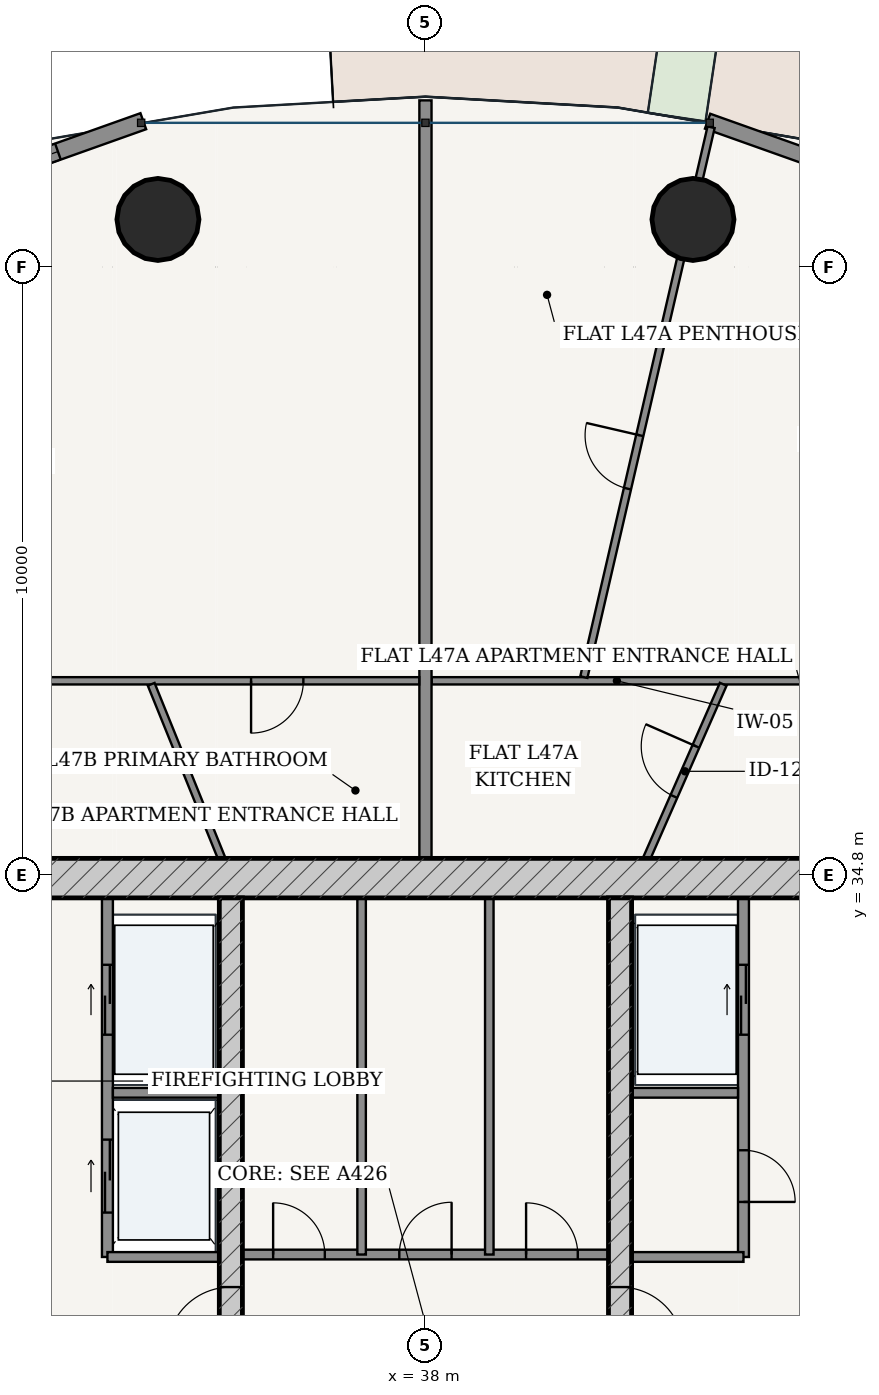
"""IFC4 building model, lengths in metres.
Left out: names, types, materials, properties, quantities, classifications, styles, units other than length and angle.
Written with IfcOpenShell. Run it as: python <this file> out.ifc"""

import sys

from ifc_helpers import new_model, si_unit, direction, frame, frame_2d, origin, origin_2d, place, context, subcontext, project, spatial, rectangle, hollow_circle, extrude, source, transform, mapped, element, fill, save


model = new_model("IFC4")
c1 = context("Model", 3, precision=1e-05, world=origin(), true_north=direction((-0.2419218956, 0.970295726276)))
c2 = subcontext(c1, "Body", "Model", "MODEL_VIEW")
j1 = project(units=[si_unit("LENGTHUNIT", "METRE"), si_unit("PLANEANGLEUNIT", "RADIAN")], contexts=[c1])
p1 = place(None, origin())
s1 = spatial("IfcSite", under=j1, at=p1, CompositionType="ELEMENT")
p2 = place(p1, origin())
s2 = spatial("IfcBuilding", under=s1, at=p2, CompositionType="ELEMENT")
p3 = place(p2, frame((0.0, 0.0, 178.6)))
s3 = spatial("IfcBuildingStorey", under=s2, at=p3, CompositionType="ELEMENT", Elevation=178.6)
p4 = place(p3, frame((28.725, 34.75, 0.0), z_axis=(0.0, 0.0, 1.0), x_axis=(1.0, 0.0, 0.0)))
e1 = element("IfcWall", 1, at=p4, inside=s3, PredefinedType="SHEAR", context=c2, shape_type="SweptSolid", body=[
    extrude(rectangle(XDim=18.55, YDim=0.65, at=frame_2d((9.275, 0.0))), origin(), (0.0, 0.0, 1.0), 3.33),
])
p5 = place(p3, frame((34.8, 19.175, 0.0), z_axis=(0.0, 0.0, 1.0), x_axis=(0.0, 1.0, 0.0)))
e2 = element("IfcWall", 2, at=p5, inside=s3, PredefinedType="SHEAR", context=c2, shape_type="SweptSolid", body=[
    extrude(rectangle(XDim=15.25, YDim=0.38, at=frame_2d((7.625, 0.0))), origin(), (0.0, 0.0, 1.0), 3.33),
])
p6 = place(p5, frame((7.8, 0.0, 0.0)))
e3 = element("IfcOpeningElement", 3, at=p6, cuts=e2, PredefinedType="OPENING", context=c2, shape_type="SweptSolid", body=[
    extrude(rectangle(XDim=1.05, YDim=2.15, at=frame_2d((0.525, 1.075))), frame((0.0, 0.2, 0.0), z_axis=(0.0, -1.0, 0.0), x_axis=(1.0, 0.0, 0.0)), (0.0, 0.0, 1.0), 0.4),
])
p7 = place(p3, frame((41.2, 19.175, 0.0), z_axis=(0.0, 0.0, 1.0), x_axis=(0.0, 1.0, 0.0)))
e4 = element("IfcWall", 4, at=p7, inside=s3, PredefinedType="SHEAR", context=c2, shape_type="SweptSolid", body=[
    extrude(rectangle(XDim=15.25, YDim=0.38, at=frame_2d((7.625, 0.0))), origin(), (0.0, 0.0, 1.0), 3.33),
])
p8 = place(p7, frame((7.8, 0.0, 0.0)))
e5 = element("IfcOpeningElement", 5, at=p8, cuts=e4, PredefinedType="OPENING", context=c2, shape_type="SweptSolid", body=[
    extrude(rectangle(XDim=1.05, YDim=2.15, at=frame_2d((0.525, 1.075))), frame((0.0, 0.2, 0.0), z_axis=(0.0, -1.0, 0.0), x_axis=(1.0, 0.0, 0.0)), (0.0, 0.0, 1.0), 0.4),
])
for number, where, z_axis, x_axis in (
    (6, (42.399, 45.582, 0.0), (0.0, 0.0, 1.0), (1.0, 0.0, 0.0)),
    (7, (33.601, 45.582, 0.0), (0.0, 0.0, 1.0), (1.0, 0.0, 0.0)),
):
    element("IfcColumn", number, at=place(p3, frame(where, z_axis=z_axis, x_axis=x_axis)), inside=s3, PredefinedType="COLUMN", context=c2, shape_type="SweptSolid", body=[
        extrude(hollow_circle(Radius=0.675, WallThickness=0.042, at=origin_2d()), origin(), (0.0, 0.0, 1.0), 3.6),
    ])
p9 = place(p3, frame((51.503, 44.043, 0.0), z_axis=(0.0, 0.0, 1.0), x_axis=(-0.942095406405, 0.335344964522, 0.0)))
e8 = element("IfcWall", 8, at=p9, inside=s3, PredefinedType="SOLIDWALL", context=c2, shape_type="SweptSolid", body=[
    extrude(rectangle(XDim=9.408, YDim=0.26, at=frame_2d((4.704, 0.0))), origin(), (0.0, 0.0, 1.0), 3.33),
])
p10 = place(p9, frame((4.029, 0.0, 0.0)))
e9 = element("IfcOpeningElement", 9, at=p10, cuts=e8, PredefinedType="OPENING", context=c2, shape_type="SweptSolid", body=[
    extrude(rectangle(XDim=1.35, YDim=2.2, at=frame_2d((0.675, 1.1))), frame((0.0, 0.14, 0.0), z_axis=(0.0, -1.0, 0.0), x_axis=(1.0, 0.0, 0.0)), (0.0, 0.0, 1.0), 0.28),
])
p11 = place(p3, frame((33.36, 47.198, 0.0), z_axis=(0.0, 0.0, 1.0), x_axis=(-0.942095406405, -0.335344964522, 0.0)))
e10 = element("IfcWall", 10, at=p11, inside=s3, PredefinedType="SOLIDWALL", context=c2, shape_type="SweptSolid", body=[
    extrude(rectangle(XDim=9.408, YDim=0.28, at=frame_2d((4.704, 0.0))), origin(), (0.0, 0.0, 1.0), 3.33),
])
p12 = place(p11, frame((1.49, 0.0, 0.85)))
e11 = element("IfcOpeningElement", 11, at=p12, cuts=e10, PredefinedType="OPENING", context=c2, shape_type="SweptSolid", body=[
    extrude(rectangle(XDim=2.1, YDim=1.95, at=frame_2d((1.05, 0.975))), frame((0.0, 0.15, 0.0), z_axis=(0.0, -1.0, 0.0), x_axis=(1.0, 0.0, 0.0)), (0.0, 0.0, 1.0), 0.3),
])
p13 = place(p11, frame((5.818, 0.0, 0.85)))
e12 = element("IfcOpeningElement", 12, at=p13, cuts=e10, PredefinedType="OPENING", context=c2, shape_type="SweptSolid", body=[
    extrude(rectangle(XDim=2.1, YDim=1.95, at=frame_2d((1.05, 0.975))), frame((0.0, 0.15, 0.0), z_axis=(0.0, -1.0, 0.0), x_axis=(1.0, 0.0, 0.0)), (0.0, 0.0, 1.0), 0.3),
])
p14 = place(p3, frame((32.77, 28.52, 0.0), z_axis=(0.0, 0.0, 1.0), x_axis=(0.0, 1.0, 0.0)))
e13 = element("IfcWall", 13, at=p14, inside=s3, PredefinedType="PARTITIONING", context=c2, shape_type="SweptSolid", body=[
    extrude(rectangle(XDim=5.905, YDim=0.18, at=frame_2d((2.953, 0.0))), origin(), (0.0, 0.0, 1.0), 3.33),
])
p15 = place(p14, frame((3.655, 0.0, 0.0)))
e14 = element("IfcOpeningElement", 14, at=p15, cuts=e13, PredefinedType="OPENING", context=c2, shape_type="SweptSolid", body=[
    extrude(rectangle(XDim=1.15, YDim=2.2, at=frame_2d((0.575, 1.1))), frame((0.0, 0.1, 0.0), z_axis=(0.0, -1.0, 0.0), x_axis=(1.0, 0.0, 0.0)), (0.0, 0.0, 1.0), 0.2),
])
p16 = place(p14, frame((0.73, 0.0, 0.0)))
e15 = element("IfcOpeningElement", 15, at=p16, cuts=e13, PredefinedType="OPENING", context=c2, shape_type="SweptSolid", body=[
    extrude(rectangle(XDim=1.2, YDim=2.25, at=frame_2d((0.6, 1.125))), frame((0.0, 0.1, 0.0), z_axis=(0.0, -1.0, 0.0), x_axis=(1.0, 0.0, 0.0)), (0.0, 0.0, 1.0), 0.2),
])
p17 = place(p3, frame((32.86, 31.22, 0.0), z_axis=(0.0, 0.0, 1.0), x_axis=(1.0, 0.0, 0.0)))
e16 = element("IfcWall", 16, at=p17, inside=s3, PredefinedType="PARTITIONING", context=c2, shape_type="SweptSolid", body=[
    extrude(rectangle(XDim=1.75, YDim=0.16, at=frame_2d((0.875, 0.0))), origin(), (0.0, 0.0, 1.0), 3.33),
])
p18 = place(p3, frame((32.77, 28.52, 0.0), z_axis=(0.0, 0.0, 1.0), x_axis=(1.0, 0.0, 0.0)))
e17 = element("IfcWall", 17, at=p18, inside=s3, PredefinedType="PARTITIONING", context=c2, shape_type="SweptSolid", body=[
    extrude(rectangle(XDim=1.84, YDim=0.16, at=frame_2d((0.92, 0.0))), origin(), (0.0, 0.0, 1.0), 3.33),
])
p19 = place(p3, frame((43.23, 28.52, 0.0), z_axis=(0.0, 0.0, 1.0), x_axis=(0.0, 1.0, 0.0)))
e18 = element("IfcWall", 18, at=p19, inside=s3, PredefinedType="PARTITIONING", context=c2, shape_type="SweptSolid", body=[
    extrude(rectangle(XDim=5.905, YDim=0.18, at=frame_2d((2.953, 0.0))), origin(), (0.0, 0.0, 1.0), 3.33),
])
p20 = place(p19, frame((0.905, 0.0, 0.0)))
e19 = element("IfcOpeningElement", 19, at=p20, cuts=e18, PredefinedType="OPENING", context=c2, shape_type="SweptSolid", body=[
    extrude(rectangle(XDim=0.85, YDim=2.1, at=frame_2d((0.425, 1.05))), frame((0.0, 0.1, 0.0), z_axis=(0.0, -1.0, 0.0), x_axis=(1.0, 0.0, 0.0)), (0.0, 0.0, 1.0), 0.2),
])
p21 = place(p19, frame((3.655, 0.0, 0.0)))
e20 = element("IfcOpeningElement", 20, at=p21, cuts=e18, PredefinedType="OPENING", context=c2, shape_type="SweptSolid", body=[
    extrude(rectangle(XDim=1.15, YDim=2.2, at=frame_2d((0.575, 1.1))), frame((0.0, 0.1, 0.0), z_axis=(0.0, -1.0, 0.0), x_axis=(1.0, 0.0, 0.0)), (0.0, 0.0, 1.0), 0.2),
])
p22 = place(p3, frame((41.39, 31.22, 0.0), z_axis=(0.0, 0.0, 1.0), x_axis=(1.0, 0.0, 0.0)))
e21 = element("IfcWall", 21, at=p22, inside=s3, PredefinedType="PARTITIONING", context=c2, shape_type="SweptSolid", body=[
    extrude(rectangle(XDim=1.75, YDim=0.16, at=frame_2d((0.875, 0.0))), origin(), (0.0, 0.0, 1.0), 3.33),
])
p23 = place(p3, frame((41.39, 28.52, 0.0), z_axis=(0.0, 0.0, 1.0), x_axis=(1.0, 0.0, 0.0)))
e22 = element("IfcWall", 22, at=p23, inside=s3, PredefinedType="PARTITIONING", context=c2, shape_type="SweptSolid", body=[
    extrude(rectangle(XDim=1.84, YDim=0.16, at=frame_2d((0.92, 0.0))), origin(), (0.0, 0.0, 1.0), 3.33),
])
p24 = place(p3, frame((34.99, 28.56, 0.0), z_axis=(0.0, 0.0, 1.0), x_axis=(1.0, 0.0, 0.0)))
e23 = element("IfcWall", 23, at=p24, inside=s3, PredefinedType="PARTITIONING", context=c2, shape_type="SweptSolid", body=[
    extrude(rectangle(XDim=6.02, YDim=0.16, at=frame_2d((3.01, 0.0))), origin(), (0.0, 0.0, 1.0), 3.33),
])
p25 = place(p24, frame((0.505, 0.0, 0.0)))
e24 = element("IfcOpeningElement", 24, at=p25, cuts=e23, PredefinedType="OPENING", context=c2, shape_type="SweptSolid", body=[
    extrude(rectangle(XDim=0.85, YDim=2.1, at=frame_2d((0.425, 1.05))), frame((0.0, 0.09, 0.0), z_axis=(0.0, -1.0, 0.0), x_axis=(1.0, 0.0, 0.0)), (0.0, 0.0, 1.0), 0.18),
])
p26 = place(p24, frame((2.58, 0.0, 0.0)))
e25 = element("IfcOpeningElement", 25, at=p26, cuts=e23, PredefinedType="OPENING", context=c2, shape_type="SweptSolid", body=[
    extrude(rectangle(XDim=0.86, YDim=2.1, at=frame_2d((0.43, 1.05))), frame((0.0, 0.09, 0.0), z_axis=(0.0, -1.0, 0.0), x_axis=(1.0, 0.0, 0.0)), (0.0, 0.0, 1.0), 0.18),
])
p27 = place(p24, frame((4.665, 0.0, 0.0)))
e26 = element("IfcOpeningElement", 26, at=p27, cuts=e23, PredefinedType="OPENING", context=c2, shape_type="SweptSolid", body=[
    extrude(rectangle(XDim=0.85, YDim=2.1, at=frame_2d((0.425, 1.05))), frame((0.0, 0.09, 0.0), z_axis=(0.0, -1.0, 0.0), x_axis=(1.0, 0.0, 0.0)), (0.0, 0.0, 1.0), 0.18),
])
for number, where, z_axis, x_axis in (
    (27, (36.95, 28.56, 0.0), (0.0, 0.0, 1.0), (0.0, 1.0, 0.0)),
    (28, (39.05, 28.56, 0.0), (0.0, 0.0, 1.0), (0.0, 1.0, 0.0)),
):
    element("IfcWall", number, at=place(p3, frame(where, z_axis=z_axis, x_axis=x_axis)), inside=s3, PredefinedType="PARTITIONING", context=c2, shape_type="SweptSolid", body=[
        extrude(rectangle(XDim=5.865, YDim=0.14, at=frame_2d((2.933, 0.0))), origin(), (0.0, 0.0, 1.0), 3.33),
    ])
p28 = place(p3, frame((38.102, 37.995, 0.0), z_axis=(0.0, 0.0, 1.0), x_axis=(1.0, 0.0, 0.0)))
e29 = element("IfcWall", 29, at=p28, inside=s3, PredefinedType="PARTITIONING", context=c2, shape_type="SweptSolid", body=[
    extrude(rectangle(XDim=6.093, YDim=0.12, at=frame_2d((3.046, 0.0))), origin(), (0.0, 0.0, 1.0), 2.776),
])
p29 = place(p3, frame((40.605, 38.055, 0.0), z_axis=(0.0, 0.0, 1.0), x_axis=(0.225466493239, 0.974250922723, 0.0)))
e30 = element("IfcWall", 30, at=p29, inside=s3, PredefinedType="PARTITIONING", context=c2, shape_type="SweptSolid", body=[
    extrude(rectangle(XDim=9.282, YDim=0.12, at=frame_2d((4.641, 0.0))), origin(), (0.0, 0.0, 1.0), 2.776),
])
p30 = place(p29, frame((3.182, 0.0, 0.0)))
e31 = element("IfcOpeningElement", 31, at=p30, cuts=e30, PredefinedType="OPENING", context=c2, shape_type="SweptSolid", body=[
    extrude(rectangle(XDim=0.9, YDim=2.15, at=frame_2d((0.45, 1.075))), frame((0.0, 0.07, 0.0), z_axis=(0.0, -1.0, 0.0), x_axis=(1.0, 0.0, 0.0)), (0.0, 0.0, 1.0), 0.14),
])
p31 = place(p3, frame((41.638, 35.075, 0.0), z_axis=(0.0, 0.0, 1.0), x_axis=(0.402456087228, 0.915439292282, 0.0)))
e32 = element("IfcWall", 32, at=p31, inside=s3, PredefinedType="PARTITIONING", context=c2, shape_type="SweptSolid", body=[
    extrude(rectangle(XDim=3.128, YDim=0.12, at=frame_2d((1.564, 0.0))), origin(), (0.0, 0.0, 1.0), 3.33),
])
p32 = place(p31, frame((1.114, 0.0, 0.0)))
e33 = element("IfcOpeningElement", 33, at=p32, cuts=e32, PredefinedType="OPENING", context=c2, shape_type="SweptSolid", body=[
    extrude(rectangle(XDim=0.9, YDim=2.15, at=frame_2d((0.45, 1.075))), frame((0.0, 0.07, 0.0), z_axis=(0.0, -1.0, 0.0), x_axis=(1.0, 0.0, 0.0)), (0.0, 0.0, 1.0), 0.14),
])
p33 = place(p3, frame((38.0, 35.075, 0.0), z_axis=(0.0, 0.0, 1.0), x_axis=(0.0, 1.0, 0.0)))
e34 = element("IfcWall", 34, at=p33, inside=s3, PredefinedType="PARTITIONING", context=c2, shape_type="SweptSolid", body=[
    extrude(rectangle(XDim=12.465, YDim=0.2, at=frame_2d((6.232, 0.0))), origin(), (0.0, 0.0, 1.0), 2.415),
])
p34 = place(p3, frame((31.805, 37.995, 0.0), z_axis=(0.0, 0.0, 1.0), x_axis=(1.0, 0.0, 0.0)))
e35 = element("IfcWall", 35, at=p34, inside=s3, PredefinedType="PARTITIONING", context=c2, shape_type="SweptSolid", body=[
    extrude(rectangle(XDim=6.093, YDim=0.12, at=frame_2d((3.046, 0.0))), origin(), (0.0, 0.0, 1.0), 2.776),
])
p35 = place(p34, frame((3.327, 0.0, 0.0)))
e36 = element("IfcOpeningElement", 36, at=p35, cuts=e35, PredefinedType="OPENING", context=c2, shape_type="SweptSolid", body=[
    extrude(rectangle(XDim=0.86, YDim=2.15, at=frame_2d((0.43, 1.075))), frame((0.0, 0.07, 0.0), z_axis=(0.0, -1.0, 0.0), x_axis=(1.0, 0.0, 0.0)), (0.0, 0.0, 1.0), 0.14),
])
p36 = place(p3, frame((34.649, 35.075, 0.0), z_axis=(0.0, 0.0, 1.0), x_axis=(-0.375339921816, 0.926887233212, 0.0)))
e37 = element("IfcWall", 37, at=p36, inside=s3, PredefinedType="PARTITIONING", context=c2, shape_type="SweptSolid", body=[
    extrude(rectangle(XDim=3.088, YDim=0.12, at=frame_2d((1.544, 0.0))), origin(), (0.0, 0.0, 1.0), 3.33),
])
m1 = source(origin(), c2, "Body", "SweptSolid", [
    extrude(rectangle(XDim=2.1, YDim=1.95, at=frame_2d((1.05, 0.975))), frame((0.0, 0.03, 0.0), z_axis=(0.0, -1.0, 0.0), x_axis=(1.0, 0.0, 0.0)), (0.0, 0.0, 1.0), 0.06),
])
p37 = place(p12, origin())
e38 = element("IfcWindow", 38, at=p37, inside=s3, PartitioningType="SINGLE_PANEL", PredefinedType="WINDOW", context=c2, shape_type="MappedRepresentation", body=[
    mapped(m1, transform((0.0, 0.0, 0.0), scale=1.0)),
])
fill(e11, e38)
m2 = source(origin(), c2, "Body", "SweptSolid", [
    extrude(rectangle(XDim=1.05, YDim=2.15, at=frame_2d((0.525, 1.075))), frame((0.0, 0.025, 0.0), z_axis=(0.0, -1.0, 0.0), x_axis=(1.0, 0.0, 0.0)), (0.0, 0.0, 1.0), 0.05),
])
p38 = place(p6, origin())
e39 = element("IfcDoor", 39, at=p38, inside=s3, OperationType="SINGLE_SWING_LEFT", PredefinedType="DOOR", context=c2, shape_type="MappedRepresentation", body=[
    mapped(m2, transform((0.0, 0.0, 0.0), scale=1.0)),
])
fill(e3, e39)
p39 = place(p8, frame((1.05, 0.0, 0.0), z_axis=(0.0, 0.0, 1.0), x_axis=(-1.0, 0.0, 0.0)))
e40 = element("IfcDoor", 40, at=p39, inside=s3, OperationType="SINGLE_SWING_RIGHT", PredefinedType="DOOR", context=c2, shape_type="MappedRepresentation", body=[
    mapped(m2, transform((0.0, 0.0, 0.0), scale=1.0)),
])
fill(e5, e40)
m3 = source(origin(), c2, "Body", "SweptSolid", [
    extrude(rectangle(XDim=0.85, YDim=2.1, at=frame_2d((0.425, 1.05))), frame((0.0, 0.025, 0.0), z_axis=(0.0, -1.0, 0.0), x_axis=(1.0, 0.0, 0.0)), (0.0, 0.0, 1.0), 0.05),
])
p40 = place(p20, frame((0.85, 0.0, 0.0), z_axis=(0.0, 0.0, 1.0), x_axis=(-1.0, 0.0, 0.0)))
e41 = element("IfcDoor", 41, at=p40, inside=s3, OperationType="SINGLE_SWING_RIGHT", PredefinedType="DOOR", context=c2, shape_type="MappedRepresentation", body=[
    mapped(m3, transform((0.0, 0.0, 0.0), scale=1.0)),
])
fill(e19, e41)
p41 = place(p25, origin())
e42 = element("IfcDoor", 42, at=p41, inside=s3, OperationType="SINGLE_SWING_LEFT", PredefinedType="DOOR", context=c2, shape_type="MappedRepresentation", body=[
    mapped(m3, transform((0.0, 0.0, 0.0), scale=1.0)),
])
fill(e24, e42)
m4 = source(origin(), c2, "Body", "SweptSolid", [
    extrude(rectangle(XDim=0.86, YDim=2.1, at=frame_2d((0.43, 1.05))), frame((0.0, 0.025, 0.0), z_axis=(0.0, -1.0, 0.0), x_axis=(1.0, 0.0, 0.0)), (0.0, 0.0, 1.0), 0.05),
])
p42 = place(p26, origin())
e43 = element("IfcDoor", 43, at=p42, inside=s3, OperationType="SINGLE_SWING_RIGHT", PredefinedType="DOOR", context=c2, shape_type="MappedRepresentation", body=[
    mapped(m4, transform((0.0, 0.0, 0.0), scale=1.0)),
])
fill(e25, e43)
p43 = place(p27, origin())
e44 = element("IfcDoor", 44, at=p43, inside=s3, OperationType="SINGLE_SWING_LEFT", PredefinedType="DOOR", context=c2, shape_type="MappedRepresentation", body=[
    mapped(m3, transform((0.0, 0.0, 0.0), scale=1.0)),
])
fill(e26, e44)
m5 = source(origin(), c2, "Body", "SweptSolid", [
    extrude(rectangle(XDim=1.15, YDim=2.2, at=frame_2d((0.575, 1.1))), frame((0.0, 0.025, 0.0), z_axis=(0.0, -1.0, 0.0), x_axis=(1.0, 0.0, 0.0)), (0.0, 0.0, 1.0), 0.05),
])
p44 = place(p15, origin())
e45 = element("IfcDoor", 45, at=p44, inside=s3, OperationType="DOUBLE_DOOR_SLIDING", PredefinedType="DOOR", context=c2, shape_type="MappedRepresentation", body=[
    mapped(m5, transform((0.0, 0.0, 0.0), scale=1.0)),
])
fill(e14, e45)
p45 = place(p21, origin())
e46 = element("IfcDoor", 46, at=p45, inside=s3, OperationType="DOUBLE_DOOR_SLIDING", PredefinedType="DOOR", context=c2, shape_type="MappedRepresentation", body=[
    mapped(m5, transform((0.0, 0.0, 0.0), scale=1.0)),
])
fill(e20, e46)
m6 = source(origin(), c2, "Body", "SweptSolid", [
    extrude(rectangle(XDim=1.2, YDim=2.25, at=frame_2d((0.6, 1.125))), frame((0.0, 0.025, 0.0), z_axis=(0.0, -1.0, 0.0), x_axis=(1.0, 0.0, 0.0)), (0.0, 0.0, 1.0), 0.05),
])
p46 = place(p16, origin())
e47 = element("IfcDoor", 47, at=p46, inside=s3, OperationType="DOUBLE_DOOR_SLIDING", PredefinedType="DOOR", context=c2, shape_type="MappedRepresentation", body=[
    mapped(m6, transform((0.0, 0.0, 0.0), scale=1.0)),
])
fill(e15, e47)
m7 = source(origin(), c2, "Body", "SweptSolid", [
    extrude(rectangle(XDim=0.9, YDim=2.15, at=frame_2d((0.45, 1.075))), frame((0.0, 0.025, 0.0), z_axis=(0.0, -1.0, 0.0), x_axis=(1.0, 0.0, 0.0)), (0.0, 0.0, 1.0), 0.05),
])
p47 = place(p32, origin())
e48 = element("IfcDoor", 48, at=p47, inside=s3, OperationType="SINGLE_SWING_RIGHT", PredefinedType="DOOR", context=c2, shape_type="MappedRepresentation", body=[
    mapped(m7, transform((0.0, 0.0, 0.0), scale=1.0)),
])
fill(e33, e48)
p48 = place(p30, origin())
e49 = element("IfcDoor", 49, at=p48, inside=s3, OperationType="SINGLE_SWING_RIGHT", PredefinedType="DOOR", context=c2, shape_type="MappedRepresentation", body=[
    mapped(m7, transform((0.0, 0.0, 0.0), scale=1.0)),
])
fill(e31, e49)
m8 = source(origin(), c2, "Body", "SweptSolid", [
    extrude(rectangle(XDim=0.86, YDim=2.15, at=frame_2d((0.43, 1.075))), frame((0.0, 0.025, 0.0), z_axis=(0.0, -1.0, 0.0), x_axis=(1.0, 0.0, 0.0)), (0.0, 0.0, 1.0), 0.05),
])
p49 = place(p35, frame((0.86, 0.0, 0.0), z_axis=(0.0, 0.0, 1.0), x_axis=(-1.0, 0.0, 0.0)))
e50 = element("IfcDoor", 50, at=p49, inside=s3, OperationType="SINGLE_SWING_RIGHT", PredefinedType="DOOR", context=c2, shape_type="MappedRepresentation", body=[
    mapped(m8, transform((0.0, 0.0, 0.0), scale=1.0)),
])
fill(e36, e50)
save(model, sys.argv[1])
